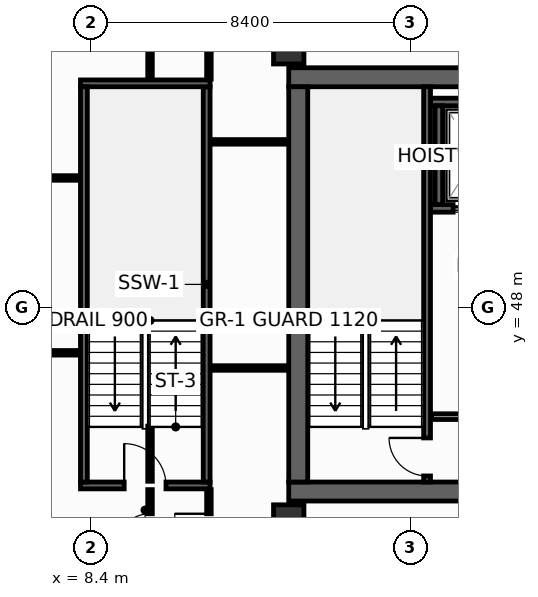
"""IFC4 building model, lengths in metres.
Left out: names, types, materials, properties, quantities, classifications, styles, units other than length and angle.
Written with IfcOpenShell. Run it as: python <this file> out.ifc"""

import sys

from ifc_helpers import new_model, si_unit, direction, frame, frame_2d, origin, origin_2d, place, context, subcontext, project, spatial, rectangle, hollow_rectangle, extrude, element, fill, save


model = new_model("IFC4")
c1 = context("Model", 3, precision=1e-05, world=origin(), true_north=direction((0.0, 1.0)))
c2 = subcontext(c1, "Body", "Model", "MODEL_VIEW")
j1 = project(units=[si_unit("LENGTHUNIT", "METRE"), si_unit("PLANEANGLEUNIT", "RADIAN")], contexts=[c1])
p1 = place(None, origin())
s1 = spatial("IfcSite", under=j1, at=p1, CompositionType="ELEMENT")
p2 = place(p1, origin())
s2 = spatial("IfcBuilding", under=s1, at=p2, CompositionType="ELEMENT")
p3 = place(p2, frame((0.0, 0.0, 182.8)))
s3 = spatial("IfcBuildingStorey", under=s2, at=p3, CompositionType="ELEMENT", Elevation=182.8)
p4 = place(p3, frame((13.6, 43.15, 0.0), z_axis=(0.0, 0.0, 1.0), x_axis=(1.0, 0.0, 0.0)))
e1 = element("IfcWall", 1, at=p4, inside=s3, PredefinedType="SHEAR", context=c2, shape_type="SweptSolid", body=[
    extrude(rectangle(XDim=32.7, YDim=0.5, at=frame_2d((16.35, 0.0))), origin(), (0.0, 0.0, 1.0), 3.55),
])
p5 = place(p4, frame((5.4, 0.0, 0.0)))
e2 = element("IfcOpeningElement", 2, at=p5, cuts=e1, PredefinedType="OPENING", context=c2, shape_type="SweptSolid", body=[
    extrude(rectangle(XDim=1.1, YDim=2.15, at=frame_2d((0.55, 1.075))), frame((0.0, 0.26, 0.0), z_axis=(0.0, -1.0, 0.0), x_axis=(1.0, 0.0, 0.0)), (0.0, 0.0, 1.0), 0.52),
])
p6 = place(p4, frame((25.6, 0.0, 0.0)))
e3 = element("IfcOpeningElement", 3, at=p6, cuts=e1, PredefinedType="OPENING", context=c2, shape_type="SweptSolid", body=[
    extrude(rectangle(XDim=1.1, YDim=2.15, at=frame_2d((0.55, 1.075))), frame((0.0, 0.26, 0.0), z_axis=(0.0, -1.0, 0.0), x_axis=(1.0, 0.0, 0.0)), (0.0, 0.0, 1.0), 0.52),
])
p7 = place(p3, frame((13.6, 54.05, 0.0), z_axis=(0.0, 0.0, 1.0), x_axis=(1.0, 0.0, 0.0)))
e4 = element("IfcWall", 4, at=p7, inside=s3, PredefinedType="SHEAR", context=c2, shape_type="SweptSolid", body=[
    extrude(rectangle(XDim=32.7, YDim=0.5, at=frame_2d((16.35, 0.0))), origin(), (0.0, 0.0, 1.0), 3.55),
])
p8 = place(p3, frame((13.85, 43.4, 0.0), z_axis=(0.0, 0.0, 1.0), x_axis=(0.0, 1.0, 0.0)))
e5 = element("IfcWall", 5, at=p8, inside=s3, PredefinedType="SHEAR", context=c2, shape_type="SweptSolid", body=[
    extrude(rectangle(XDim=10.4, YDim=0.5, at=frame_2d((5.2, 0.0))), origin(), (0.0, 0.0, 1.0), 3.55),
])
for number, where, z_axis, x_axis in (
    (6, (13.6, 54.8, 0.0), (0.0, 0.0, 1.0), (1.0, 0.0, 0.0)),
    (7, (13.6, 42.4, 0.0), (0.0, 0.0, 1.0), (1.0, 0.0, 0.0)),
):
    element("IfcColumn", number, at=place(p3, frame(where, z_axis=z_axis, x_axis=x_axis)), inside=s3, PredefinedType="COLUMN", context=c2, shape_type="SweptSolid", body=[
        extrude(hollow_rectangle(XDim=0.8, YDim=0.8, WallThickness=0.036, at=origin_2d()), origin(), (0.0, 0.0, 1.0), 3.8),
    ])
p9 = place(p3, frame((17.33, 50.6, 0.0), z_axis=(0.0, 0.0, 1.0), x_axis=(1.0, 0.0, 0.0)))
e8 = element("IfcWall", 8, at=p9, inside=s3, PredefinedType="SHEAR", context=c2, shape_type="SweptSolid", body=[
    extrude(rectangle(XDim=2.52, YDim=0.2, at=frame_2d((1.26, 0.0))), origin(), (0.0, 0.0, 1.0), 3.55),
])
p10 = place(p9, frame((0.595, 0.0, 0.0)))
e9 = element("IfcOpeningElement", 9, at=p10, cuts=e8, PredefinedType="OPENING", context=c2, shape_type="SweptSolid", body=[
    extrude(rectangle(XDim=1.25, YDim=2.3, at=frame_2d((0.625, 1.15))), frame((0.0, 0.11, 0.0), z_axis=(0.0, -1.0, 0.0), x_axis=(1.0, 0.0, 0.0)), (0.0, 0.0, 1.0), 0.22),
])
p11 = place(p3, frame((17.33, 53.4, 0.0), z_axis=(0.0, 0.0, 1.0), x_axis=(1.0, 0.0, 0.0)))
e10 = element("IfcWall", 10, at=p11, inside=s3, PredefinedType="SHEAR", context=c2, shape_type="SweptSolid", body=[
    extrude(rectangle(XDim=2.52, YDim=0.2, at=frame_2d((1.26, 0.0))), origin(), (0.0, 0.0, 1.0), 3.55),
])
p12 = place(p3, frame((17.55, 50.7, 0.0), z_axis=(0.0, 0.0, 1.0), x_axis=(0.0, 1.0, 0.0)))
e11 = element("IfcWall", 11, at=p12, inside=s3, PredefinedType="SHEAR", context=c2, shape_type="SweptSolid", body=[
    extrude(rectangle(XDim=2.6, YDim=0.2, at=frame_2d((1.3, 0.0))), origin(), (0.0, 0.0, 1.0), 3.55),
])
p13 = place(p3, frame((17.24, 43.4, 0.0), z_axis=(0.0, 0.0, 1.0), x_axis=(0.0, 1.0, 0.0)))
e12 = element("IfcWall", 12, at=p13, inside=s3, PredefinedType="SHEAR", context=c2, shape_type="SweptSolid", body=[
    extrude(rectangle(XDim=10.4, YDim=0.18, at=frame_2d((5.2, 0.0))), origin(), (0.0, 0.0, 1.0), 3.55),
])
p14 = place(p13, frame((0.16, 0.0, 0.0)))
e13 = element("IfcOpeningElement", 13, at=p14, cuts=e12, PredefinedType="OPENING", context=c2, shape_type="SweptSolid", body=[
    extrude(rectangle(XDim=1.0, YDim=2.15, at=frame_2d((0.5, 1.075))), frame((0.0, 0.1, 0.0), z_axis=(0.0, -1.0, 0.0), x_axis=(1.0, 0.0, 0.0)), (0.0, 0.0, 1.0), 0.2),
])
p15 = place(p3, frame((8.12, 43.31, 0.0), z_axis=(0.0, 0.0, 1.0), x_axis=(1.0, 0.0, 0.0)))
e14 = element("IfcWall", 14, at=p15, inside=s3, PredefinedType="SHEAR", context=c2, shape_type="SweptSolid", body=[
    extrude(rectangle(XDim=3.41, YDim=0.18, at=frame_2d((1.705, 0.0))), origin(), (0.0, 0.0, 1.0), 3.55),
])
p16 = place(p15, frame((1.15, 0.0, 0.0)))
e15 = element("IfcOpeningElement", 15, at=p16, cuts=e14, PredefinedType="OPENING", context=c2, shape_type="SweptSolid", body=[
    extrude(rectangle(XDim=1.1, YDim=2.15, at=frame_2d((0.55, 1.075))), frame((0.0, 0.1, 0.0), z_axis=(0.0, -1.0, 0.0), x_axis=(1.0, 0.0, 0.0)), (0.0, 0.0, 1.0), 0.2),
])
p17 = place(p3, frame((11.44, 43.4, 0.0), z_axis=(0.0, 0.0, 1.0), x_axis=(0.0, 1.0, 0.0)))
e16 = element("IfcWall", 16, at=p17, inside=s3, PredefinedType="SHEAR", context=c2, shape_type="SweptSolid", body=[
    extrude(rectangle(XDim=10.4, YDim=0.18, at=frame_2d((5.2, 0.0))), origin(), (0.0, 0.0, 1.0), 3.55),
])
p18 = place(p3, frame((11.53, 53.89, 0.0), z_axis=(0.0, 0.0, 1.0), x_axis=(-1.0, 0.0, 0.0)))
e17 = element("IfcWall", 17, at=p18, inside=s3, PredefinedType="SHEAR", context=c2, shape_type="SweptSolid", body=[
    extrude(rectangle(XDim=3.41, YDim=0.18, at=frame_2d((1.705, 0.0))), origin(), (0.0, 0.0, 1.0), 3.55),
])
p19 = place(p3, frame((8.21, 53.8, 0.0), z_axis=(0.0, 0.0, 1.0), x_axis=(0.0, -1.0, 0.0)))
e18 = element("IfcWall", 18, at=p19, inside=s3, PredefinedType="SHEAR", context=c2, shape_type="SweptSolid", body=[
    extrude(rectangle(XDim=10.4, YDim=0.18, at=frame_2d((5.2, 0.0))), origin(), (0.0, 0.0, 1.0), 3.55),
])
p20 = place(p3, frame((17.36, 45.12, 0.0), z_axis=(0.0, 0.0, 1.0), x_axis=(1.0, 0.0, 0.0)))
e19 = element("IfcWall", 19, at=p20, inside=s3, PredefinedType="PARTITIONING", context=c2, shape_type="SweptSolid", body=[
    extrude(rectangle(XDim=5.14, YDim=0.15, at=frame_2d((2.57, 0.0))), origin(), (0.0, 0.0, 1.0), 3.55),
])
p21 = place(p20, frame((1.8, 0.0, 0.0)))
e20 = element("IfcOpeningElement", 20, at=p21, cuts=e19, PredefinedType="OPENING", context=c2, shape_type="SweptSolid", body=[
    extrude(rectangle(XDim=1.1, YDim=2.15, at=frame_2d((0.55, 1.075))), frame((0.0, 0.085, 0.0), z_axis=(0.0, -1.0, 0.0), x_axis=(1.0, 0.0, 0.0)), (0.0, 0.0, 1.0), 0.17),
])
p22 = place(p3, frame((11.55, 52.35, 0.0), z_axis=(0.0, 0.0, 1.0), x_axis=(1.0, 0.0, 0.0)))
e21 = element("IfcWall", 21, at=p22, inside=s3, PredefinedType="PARTITIONING", context=c2, shape_type="SweptSolid", body=[
    extrude(rectangle(XDim=2.03, YDim=0.12, at=frame_2d((1.015, 0.0))), origin(), (0.0, 0.0, 1.0), 3.55),
])
p23 = place(p3, frame((11.5, 54.0, 0.0), z_axis=(0.0, 0.0, 1.0), x_axis=(0.0, 1.0, 0.0)))
e22 = element("IfcWall", 22, at=p23, inside=s3, PredefinedType="PARTITIONING", context=c2, shape_type="SweptSolid", body=[
    extrude(rectangle(XDim=1.995, YDim=0.12, at=frame_2d((0.998, 0.0))), origin(), (0.0, 0.0, 1.0), 2.935),
])
p24 = place(p3, frame((5.021, 46.8, 0.0), z_axis=(0.0, 0.0, 1.0), x_axis=(1.0, 0.0, 0.0)))
e23 = element("IfcWall", 23, at=p24, inside=s3, PredefinedType="PARTITIONING", context=c2, shape_type="SweptSolid", body=[
    extrude(rectangle(XDim=3.079, YDim=0.12, at=frame_2d((1.54, 0.0))), origin(), (0.0, 0.0, 1.0), 2.835),
])
p25 = place(p3, frame((4.242, 51.4, 0.0), z_axis=(0.0, 0.0, 1.0), x_axis=(1.0, 0.0, 0.0)))
e24 = element("IfcWall", 24, at=p25, inside=s3, PredefinedType="PARTITIONING", context=c2, shape_type="SweptSolid", body=[
    extrude(rectangle(XDim=3.858, YDim=0.12, at=frame_2d((1.929, 0.0))), origin(), (0.0, 0.0, 1.0), 2.835),
])
p26 = place(p3, frame((9.95, 41.03, 0.0), z_axis=(0.0, 0.0, 1.0), x_axis=(0.0, 1.0, 0.0)))
e25 = element("IfcWall", 25, at=p26, inside=s3, PredefinedType="PARTITIONING", context=c2, shape_type="SweptSolid", body=[
    extrude(rectangle(XDim=2.17, YDim=0.12, at=frame_2d((1.085, 0.0))), origin(), (0.0, 0.0, 1.0), 2.835),
])
p27 = place(p26, frame((0.635, 0.0, 0.0)))
e26 = element("IfcOpeningElement", 26, at=p27, cuts=e25, PredefinedType="OPENING", context=c2, shape_type="SweptSolid", body=[
    extrude(rectangle(XDim=0.9, YDim=2.1, at=frame_2d((0.45, 1.05))), frame((0.0, 0.07, 0.0), z_axis=(0.0, -1.0, 0.0), x_axis=(1.0, 0.0, 0.0)), (0.0, 0.0, 1.0), 0.14),
])
p28 = place(p3, frame((9.95, 43.42, 0.0), z_axis=(0.0, 0.0, 1.0), x_axis=(0.0, 1.0, 0.0)))
e27 = element("IfcWall", 27, at=p28, inside=s3, PredefinedType="PARTITIONING", context=c2, shape_type="SweptSolid", body=[
    extrude(rectangle(XDim=1.45, YDim=0.12, at=frame_2d((0.725, 0.0))), origin(), (0.0, 0.0, 1.0), 3.55),
])
p29 = place(p3, frame((9.95, 54.0, 0.0), z_axis=(0.0, 0.0, 1.0), x_axis=(0.0, 1.0, 0.0)))
e28 = element("IfcWall", 28, at=p29, inside=s3, PredefinedType="PARTITIONING", context=c2, shape_type="SweptSolid", body=[
    extrude(rectangle(XDim=1.995, YDim=0.12, at=frame_2d((0.998, 0.0))), origin(), (0.0, 0.0, 1.0), 2.935),
])
p30 = place(p3, frame((11.55, 46.4, 0.0), z_axis=(0.0, 0.0, 1.0), x_axis=(1.0, 0.0, 0.0)))
e29 = element("IfcWall", 29, at=p30, inside=s3, PredefinedType="PARTITIONING", context=c2, shape_type="SweptSolid", body=[
    extrude(rectangle(XDim=2.03, YDim=0.12, at=frame_2d((1.015, 0.0))), origin(), (0.0, 0.0, 1.0), 3.55),
])
p31 = place(p3, frame((11.5, 41.03, 0.0), z_axis=(0.0, 0.0, 1.0), x_axis=(0.0, 1.0, 0.0)))
e30 = element("IfcWall", 30, at=p31, inside=s3, PredefinedType="PARTITIONING", context=c2, shape_type="SweptSolid", body=[
    extrude(rectangle(XDim=2.17, YDim=0.12, at=frame_2d((1.085, 0.0))), origin(), (0.0, 0.0, 1.0), 2.835),
])
p32 = place(p31, frame((0.635, 0.0, 0.0)))
e31 = element("IfcOpeningElement", 31, at=p32, cuts=e30, PredefinedType="OPENING", context=c2, shape_type="SweptSolid", body=[
    extrude(rectangle(XDim=0.9, YDim=2.1, at=frame_2d((0.45, 1.05))), frame((0.0, 0.07, 0.0), z_axis=(0.0, -1.0, 0.0), x_axis=(1.0, 0.0, 0.0)), (0.0, 0.0, 1.0), 0.14),
])
p33 = place(p3, frame((13.8, 41.03, 0.0), z_axis=(0.0, 0.0, 1.0), x_axis=(0.0, 1.0, 0.0)))
e32 = element("IfcWall", 32, at=p33, inside=s3, PredefinedType="PARTITIONING", context=c2, shape_type="SweptSolid", body=[
    extrude(rectangle(XDim=1.85, YDim=0.15, at=frame_2d((0.925, 0.0))), origin(), (0.0, 0.0, 1.0), 3.55),
])
p34 = place(p10, origin())
e33 = element("IfcDoor", 33, at=p34, inside=s3, OperationType="SLIDING_TO_LEFT", PredefinedType="DOOR", context=c2, shape_type="SweptSolid", body=[
    extrude(rectangle(XDim=1.25, YDim=2.3, at=frame_2d((0.625, 1.15))), frame((0.0, 0.025, 0.0), z_axis=(0.0, -1.0, 0.0), x_axis=(1.0, 0.0, 0.0)), (0.0, 0.0, 1.0), 0.05),
])
fill(e9, e33)
p35 = place(p14, origin())
e34 = element("IfcDoor", 34, at=p35, inside=s3, OperationType="SINGLE_SWING_RIGHT", PredefinedType="DOOR", context=c2, shape_type="SweptSolid", body=[
    extrude(rectangle(XDim=1.0, YDim=2.15, at=frame_2d((0.5, 1.075))), frame((0.0, 0.025, 0.0), z_axis=(0.0, -1.0, 0.0), x_axis=(1.0, 0.0, 0.0)), (0.0, 0.0, 1.0), 0.05),
])
fill(e13, e34)
p36 = place(p16, origin())
e35 = element("IfcDoor", 35, at=p36, inside=s3, OperationType="SINGLE_SWING_LEFT", PredefinedType="DOOR", context=c2, shape_type="SweptSolid", body=[
    extrude(rectangle(XDim=1.1, YDim=2.15, at=frame_2d((0.55, 1.075))), frame((0.0, 0.025, 0.0), z_axis=(0.0, -1.0, 0.0), x_axis=(1.0, 0.0, 0.0)), (0.0, 0.0, 1.0), 0.05),
])
fill(e15, e35)
p37 = place(p27, origin())
e36 = element("IfcDoor", 36, at=p37, inside=s3, OperationType="SINGLE_SWING_LEFT", PredefinedType="DOOR", context=c2, shape_type="SweptSolid", body=[
    extrude(rectangle(XDim=0.9, YDim=2.1, at=frame_2d((0.45, 1.05))), frame((0.0, 0.025, 0.0), z_axis=(0.0, -1.0, 0.0), x_axis=(1.0, 0.0, 0.0)), (0.0, 0.0, 1.0), 0.05),
])
fill(e26, e36)
p38 = place(p32, origin())
e37 = element("IfcDoor", 37, at=p38, inside=s3, OperationType="SINGLE_SWING_RIGHT", PredefinedType="DOOR", context=c2, shape_type="SweptSolid", body=[
    extrude(rectangle(XDim=0.9, YDim=2.1, at=frame_2d((0.45, 1.05))), frame((0.0, 0.025, 0.0), z_axis=(0.0, -1.0, 0.0), x_axis=(1.0, 0.0, 0.0)), (0.0, 0.0, 1.0), 0.05),
])
fill(e31, e37)
save(model, sys.argv[1])
